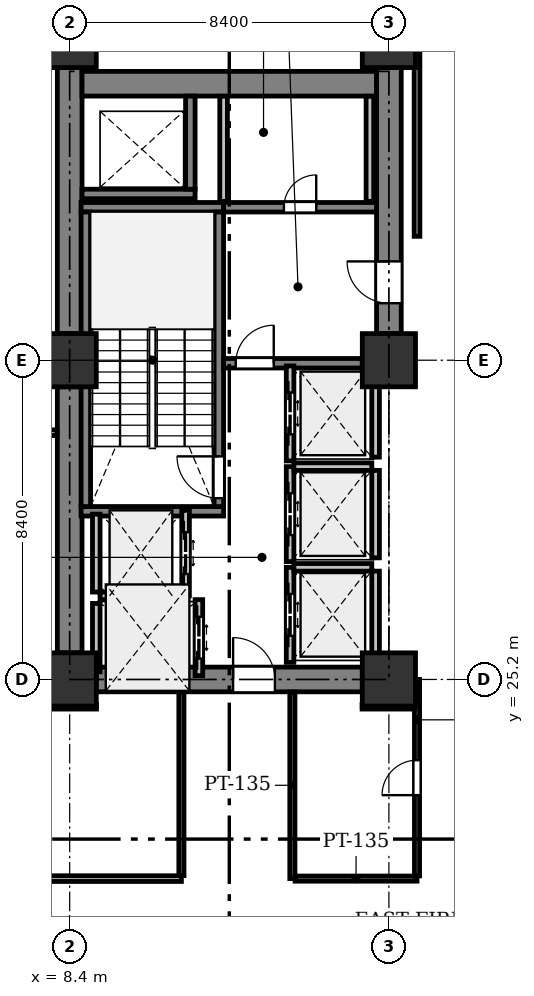
"""IFC4 building model, lengths in metres.
Left out: names, types, materials, properties, quantities, classifications, styles, units other than length and angle.
Written with IfcOpenShell. Run it as: python <this file> out.ifc"""

import sys

from ifc_helpers import new_model, si_unit, direction, frame, frame_2d, origin, origin_2d, place, context, subcontext, project, spatial, rectangle, extrude, element, fill, save


model = new_model("IFC4")
c1 = context("Model", 3, precision=1e-05, world=origin(), true_north=direction((0.0, 1.0)))
c2 = subcontext(c1, "Body", "Model", "MODEL_VIEW")
j1 = project(units=[si_unit("LENGTHUNIT", "METRE"), si_unit("PLANEANGLEUNIT", "RADIAN")], contexts=[c1])
p1 = place(None, origin())
s1 = spatial("IfcSite", under=j1, at=p1, CompositionType="ELEMENT")
p2 = place(p1, origin())
s2 = spatial("IfcBuilding", under=s1, at=p2, CompositionType="ELEMENT")
p3 = place(p2, frame((0.0, 0.0, 24.8)))
s3 = spatial("IfcBuildingStorey", under=s2, at=p3, CompositionType="ELEMENT", Elevation=24.8)
for number, where, z_axis, x_axis in (
    (1, (8.4, 25.2, 0.0), (0.0, 0.0, 1.0), (1.0, 0.0, 0.0)),
    (2, (8.4, 33.6, 0.0), (0.0, 0.0, 1.0), (1.0, 0.0, 0.0)),
    (3, (8.4, 42.0, 0.0), (0.0, 0.0, 1.0), (1.0, 0.0, 0.0)),
    (4, (16.8, 25.2, 0.0), (0.0, 0.0, 1.0), (1.0, 0.0, 0.0)),
    (5, (16.8, 33.6, 0.0), (0.0, 0.0, 1.0), (1.0, 0.0, 0.0)),
    (6, (16.8, 42.0, 0.0), (0.0, 0.0, 1.0), (1.0, 0.0, 0.0)),
):
    element("IfcColumn", number, at=place(p3, frame(where, z_axis=z_axis, x_axis=x_axis)), inside=s3, PredefinedType="COLUMN", context=c2, shape_type="SweptSolid", body=[
        extrude(rectangle(XDim=1.4, YDim=1.4, at=origin_2d()), origin(), (0.0, 0.0, 1.0), 4.2),
    ])
for number, where, z_axis, x_axis in (
    (7, (8.4, 25.9, 0.0), (0.0, 0.0, 1.0), (0.0, 1.0, 0.0)),
    (8, (8.4, 34.3, 0.0), (0.0, 0.0, 1.0), (0.0, 1.0, 0.0)),
):
    element("IfcWall", number, at=place(p3, frame(where, z_axis=z_axis, x_axis=x_axis)), inside=s3, PredefinedType="SHEAR", context=c2, shape_type="SweptSolid", body=[
        extrude(rectangle(XDim=7.0, YDim=0.65, at=frame_2d((3.5, 0.0))), origin(), (0.0, 0.0, 1.0), 3.925),
    ])
p4 = place(p3, frame((8.725, 40.875, 0.0), z_axis=(0.0, 0.0, 1.0), x_axis=(1.0, 0.0, 0.0)))
e9 = element("IfcWall", 9, at=p4, inside=s3, PredefinedType="SHEAR", context=c2, shape_type="SweptSolid", body=[
    extrude(rectangle(XDim=7.75, YDim=0.65, at=frame_2d((3.875, 0.0))), origin(), (0.0, 0.0, 1.0), 3.925),
])
p5 = place(p3, frame((16.8, 34.3, 0.0), z_axis=(0.0, 0.0, 1.0), x_axis=(0.0, 1.0, 0.0)))
e10 = element("IfcWall", 10, at=p5, inside=s3, PredefinedType="SHEAR", context=c2, shape_type="SweptSolid", body=[
    extrude(rectangle(XDim=7.0, YDim=0.65, at=frame_2d((3.5, 0.0))), origin(), (0.0, 0.0, 1.0), 3.925),
])
p6 = place(p5, frame((0.8, 0.0, 0.0)))
e11 = element("IfcOpeningElement", 11, at=p6, cuts=e10, PredefinedType="OPENING", context=c2, shape_type="SweptSolid", body=[
    extrude(rectangle(XDim=1.1, YDim=2.15, at=frame_2d((0.55, 1.075))), frame((0.0, 0.335, 0.0), z_axis=(0.0, -1.0, 0.0), x_axis=(1.0, 0.0, 0.0)), (0.0, 0.0, 1.0), 0.67),
])
p7 = place(p3, frame((9.1, 25.2, 0.0), z_axis=(0.0, 0.0, 1.0), x_axis=(1.0, 0.0, 0.0)))
e12 = element("IfcWall", 12, at=p7, inside=s3, PredefinedType="SHEAR", context=c2, shape_type="SweptSolid", body=[
    extrude(rectangle(XDim=7.0, YDim=0.65, at=frame_2d((3.5, 0.0))), origin(), (0.0, 0.0, 1.0), 3.925),
])
p8 = place(p7, frame((3.6, 0.0, 0.0)))
e13 = element("IfcOpeningElement", 13, at=p8, cuts=e12, PredefinedType="OPENING", context=c2, shape_type="SweptSolid", body=[
    extrude(rectangle(XDim=1.1, YDim=2.15, at=frame_2d((0.55, 1.075))), frame((0.0, 0.335, 0.0), z_axis=(0.0, -1.0, 0.0), x_axis=(1.0, 0.0, 0.0)), (0.0, 0.0, 1.0), 0.67),
])
for number, where, z_axis, x_axis in (
    (14, (12.45, 29.625, 0.0), (0.0, 0.0, 1.0), (-1.0, 0.0, 0.0)),
    (15, (12.45, 37.625, 0.0), (0.0, 0.0, 1.0), (-1.0, 0.0, 0.0)),
):
    element("IfcWall", number, at=place(p3, frame(where, z_axis=z_axis, x_axis=x_axis)), inside=s3, PredefinedType="SHEAR", context=c2, shape_type="SweptSolid", body=[
        extrude(rectangle(XDim=3.75, YDim=0.25, at=frame_2d((1.875, 0.0))), origin(), (0.0, 0.0, 1.0), 3.925),
    ])
p9 = place(p3, frame((12.325, 29.75, 0.0), z_axis=(0.0, 0.0, 1.0), x_axis=(0.0, 1.0, 0.0)))
e16 = element("IfcWall", 16, at=p9, inside=s3, PredefinedType="SHEAR", context=c2, shape_type="SweptSolid", body=[
    extrude(rectangle(XDim=7.75, YDim=0.25, at=frame_2d((3.875, 0.0))), origin(), (0.0, 0.0, 1.0), 3.925),
])
p10 = place(p9, frame((0.22, 0.0, 0.0)))
e17 = element("IfcOpeningElement", 17, at=p10, cuts=e16, PredefinedType="OPENING", context=c2, shape_type="SweptSolid", body=[
    extrude(rectangle(XDim=1.1, YDim=2.15, at=frame_2d((0.55, 1.075))), frame((0.0, 0.135, 0.0), z_axis=(0.0, -1.0, 0.0), x_axis=(1.0, 0.0, 0.0)), (0.0, 0.0, 1.0), 0.27),
])
p11 = place(p3, frame((8.825, 29.75, 0.0), z_axis=(0.0, 0.0, 1.0), x_axis=(0.0, 1.0, 0.0)))
e18 = element("IfcWall", 18, at=p11, inside=s3, PredefinedType="SHEAR", context=c2, shape_type="SweptSolid", body=[
    extrude(rectangle(XDim=7.75, YDim=0.25, at=frame_2d((3.875, 0.0))), origin(), (0.0, 0.0, 1.0), 3.925),
])
p12 = place(p3, frame((8.725, 37.975, 0.0), z_axis=(0.0, 0.0, 1.0), x_axis=(1.0, 0.0, 0.0)))
e19 = element("IfcWall", 19, at=p12, inside=s3, PredefinedType="SHEAR", context=c2, shape_type="SweptSolid", body=[
    extrude(rectangle(XDim=2.975, YDim=0.25, at=frame_2d((1.487, 0.0))), origin(), (0.0, 0.0, 1.0), 3.925),
])
p13 = place(p3, frame((11.575, 38.1, 0.0), z_axis=(0.0, 0.0, 1.0), x_axis=(0.0, 1.0, 0.0)))
e20 = element("IfcWall", 20, at=p13, inside=s3, PredefinedType="SHEAR", context=c2, shape_type="SweptSolid", body=[
    extrude(rectangle(XDim=2.45, YDim=0.25, at=frame_2d((1.225, 0.0))), origin(), (0.0, 0.0, 1.0), 3.925),
])
p14 = place(p3, frame((12.45, 33.52, 0.0), z_axis=(0.0, 0.0, 1.0), x_axis=(1.0, 0.0, 0.0)))
e21 = element("IfcWall", 21, at=p14, inside=s3, PredefinedType="SHEAR", context=c2, shape_type="SweptSolid", body=[
    extrude(rectangle(XDim=3.65, YDim=0.25, at=frame_2d((1.825, 0.0))), origin(), (0.0, 0.0, 1.0), 3.925),
])
p15 = place(p14, frame((0.32, 0.0, 0.0)))
e22 = element("IfcOpeningElement", 22, at=p15, cuts=e21, PredefinedType="OPENING", context=c2, shape_type="SweptSolid", body=[
    extrude(rectangle(XDim=1.0, YDim=2.15, at=frame_2d((0.5, 1.075))), frame((0.0, 0.135, 0.0), z_axis=(0.0, -1.0, 0.0), x_axis=(1.0, 0.0, 0.0)), (0.0, 0.0, 1.0), 0.27),
])
p16 = place(p3, frame((12.45, 37.625, 0.0), z_axis=(0.0, 0.0, 1.0), x_axis=(1.0, 0.0, 0.0)))
e23 = element("IfcWall", 23, at=p16, inside=s3, PredefinedType="SHEAR", context=c2, shape_type="SweptSolid", body=[
    extrude(rectangle(XDim=4.025, YDim=0.25, at=frame_2d((2.013, 0.0))), origin(), (0.0, 0.0, 1.0), 3.925),
])
p17 = place(p16, frame((1.587, 0.0, 0.0)))
e24 = element("IfcOpeningElement", 24, at=p17, cuts=e23, PredefinedType="OPENING", context=c2, shape_type="SweptSolid", body=[
    extrude(rectangle(XDim=0.85, YDim=2.15, at=frame_2d((0.425, 1.075))), frame((0.0, 0.135, 0.0), z_axis=(0.0, -1.0, 0.0), x_axis=(1.0, 0.0, 0.0)), (0.0, 0.0, 1.0), 0.27),
])
p18 = place(p3, frame((11.45, 27.4, 0.0), z_axis=(0.0, 0.0, 1.0), x_axis=(0.0, 1.0, 0.0)))
e25 = element("IfcWall", 25, at=p18, inside=s3, PredefinedType="PARTITIONING", context=c2, shape_type="SweptSolid", body=[
    extrude(rectangle(XDim=2.25, YDim=0.2, at=frame_2d((1.125, 0.0))), origin(), (0.0, 0.0, 1.0), 3.925),
])
p19 = place(p18, frame((0.575, 0.0, 0.0)))
e26 = element("IfcOpeningElement", 26, at=p19, cuts=e25, PredefinedType="OPENING", context=c2, shape_type="SweptSolid", body=[
    extrude(rectangle(XDim=1.1, YDim=2.2, at=frame_2d((0.55, 1.1))), frame((0.0, 0.11, 0.0), z_axis=(0.0, -1.0, 0.0), x_axis=(1.0, 0.0, 0.0)), (0.0, 0.0, 1.0), 0.22),
])
p20 = place(p3, frame((9.1, 27.5, 0.0), z_axis=(0.0, 0.0, 1.0), x_axis=(0.0, 1.0, 0.0)))
e27 = element("IfcWall", 27, at=p20, inside=s3, PredefinedType="PARTITIONING", context=c2, shape_type="SweptSolid", body=[
    extrude(rectangle(XDim=2.05, YDim=0.2, at=frame_2d((1.025, 0.0))), origin(), (0.0, 0.0, 1.0), 3.925),
])
p21 = place(p3, frame((9.2, 27.4, 0.0), z_axis=(0.0, 0.0, 1.0), x_axis=(1.0, 0.0, 0.0)))
e28 = element("IfcWall", 28, at=p21, inside=s3, PredefinedType="PARTITIONING", context=c2, shape_type="SweptSolid", body=[
    extrude(rectangle(XDim=2.15, YDim=0.2, at=frame_2d((1.075, 0.0))), origin(), (0.0, 0.0, 1.0), 3.925),
])
p22 = place(p3, frame((11.8, 25.3, 0.0), z_axis=(0.0, 0.0, 1.0), x_axis=(0.0, 1.0, 0.0)))
e29 = element("IfcWall", 29, at=p22, inside=s3, PredefinedType="PARTITIONING", context=c2, shape_type="SweptSolid", body=[
    extrude(rectangle(XDim=2.0, YDim=0.2, at=frame_2d((1.0, 0.0))), origin(), (0.0, 0.0, 1.0), 3.925),
])
p23 = place(p22, frame((0.45, 0.0, 0.0)))
e30 = element("IfcOpeningElement", 30, at=p23, cuts=e29, PredefinedType="OPENING", context=c2, shape_type="SweptSolid", body=[
    extrude(rectangle(XDim=1.1, YDim=2.2, at=frame_2d((0.55, 1.1))), frame((0.0, 0.11, 0.0), z_axis=(0.0, -1.0, 0.0), x_axis=(1.0, 0.0, 0.0)), (0.0, 0.0, 1.0), 0.22),
])
p24 = place(p3, frame((9.1, 25.4, 0.0), z_axis=(0.0, 0.0, 1.0), x_axis=(0.0, 1.0, 0.0)))
e31 = element("IfcWall", 31, at=p24, inside=s3, PredefinedType="PARTITIONING", context=c2, shape_type="SweptSolid", body=[
    extrude(rectangle(XDim=1.8, YDim=0.2, at=frame_2d((0.9, 0.0))), origin(), (0.0, 0.0, 1.0), 3.925),
])
p25 = place(p3, frame((14.2, 25.65, 0.0), z_axis=(0.0, 0.0, 1.0), x_axis=(0.0, 1.0, 0.0)))
e32 = element("IfcWall", 32, at=p25, inside=s3, PredefinedType="PARTITIONING", context=c2, shape_type="SweptSolid", body=[
    extrude(rectangle(XDim=2.5, YDim=0.2, at=frame_2d((1.25, 0.0))), origin(), (0.0, 0.0, 1.0), 3.925),
])
p26 = place(p25, frame((0.7, 0.0, 0.0)))
e33 = element("IfcOpeningElement", 33, at=p26, cuts=e32, PredefinedType="OPENING", context=c2, shape_type="SweptSolid", body=[
    extrude(rectangle(XDim=1.1, YDim=2.2, at=frame_2d((0.55, 1.1))), frame((0.0, 0.11, 0.0), z_axis=(0.0, -1.0, 0.0), x_axis=(1.0, 0.0, 0.0)), (0.0, 0.0, 1.0), 0.22),
])
p27 = place(p3, frame((16.45, 25.75, 0.0), z_axis=(0.0, 0.0, 1.0), x_axis=(0.0, 1.0, 0.0)))
e34 = element("IfcWall", 34, at=p27, inside=s3, PredefinedType="PARTITIONING", context=c2, shape_type="SweptSolid", body=[
    extrude(rectangle(XDim=2.3, YDim=0.2, at=frame_2d((1.15, 0.0))), origin(), (0.0, 0.0, 1.0), 3.925),
])
p28 = place(p3, frame((14.3, 28.15, 0.0), z_axis=(0.0, 0.0, 1.0), x_axis=(1.0, 0.0, 0.0)))
e35 = element("IfcWall", 35, at=p28, inside=s3, PredefinedType="PARTITIONING", context=c2, shape_type="SweptSolid", body=[
    extrude(rectangle(XDim=2.05, YDim=0.2, at=frame_2d((1.025, 0.0))), origin(), (0.0, 0.0, 1.0), 3.925),
])
p29 = place(p3, frame((14.2, 28.3, 0.0), z_axis=(0.0, 0.0, 1.0), x_axis=(0.0, 1.0, 0.0)))
e36 = element("IfcWall", 36, at=p29, inside=s3, PredefinedType="PARTITIONING", context=c2, shape_type="SweptSolid", body=[
    extrude(rectangle(XDim=2.5, YDim=0.2, at=frame_2d((1.25, 0.0))), origin(), (0.0, 0.0, 1.0), 3.925),
])
p30 = place(p29, frame((0.7, 0.0, 0.0)))
e37 = element("IfcOpeningElement", 37, at=p30, cuts=e36, PredefinedType="OPENING", context=c2, shape_type="SweptSolid", body=[
    extrude(rectangle(XDim=1.1, YDim=2.2, at=frame_2d((0.55, 1.1))), frame((0.0, 0.11, 0.0), z_axis=(0.0, -1.0, 0.0), x_axis=(1.0, 0.0, 0.0)), (0.0, 0.0, 1.0), 0.22),
])
p31 = place(p3, frame((16.45, 28.4, 0.0), z_axis=(0.0, 0.0, 1.0), x_axis=(0.0, 1.0, 0.0)))
e38 = element("IfcWall", 38, at=p31, inside=s3, PredefinedType="PARTITIONING", context=c2, shape_type="SweptSolid", body=[
    extrude(rectangle(XDim=2.3, YDim=0.2, at=frame_2d((1.15, 0.0))), origin(), (0.0, 0.0, 1.0), 3.925),
])
p32 = place(p3, frame((14.3, 30.8, 0.0), z_axis=(0.0, 0.0, 1.0), x_axis=(1.0, 0.0, 0.0)))
e39 = element("IfcWall", 39, at=p32, inside=s3, PredefinedType="PARTITIONING", context=c2, shape_type="SweptSolid", body=[
    extrude(rectangle(XDim=2.05, YDim=0.2, at=frame_2d((1.025, 0.0))), origin(), (0.0, 0.0, 1.0), 3.925),
])
p33 = place(p3, frame((14.2, 30.95, 0.0), z_axis=(0.0, 0.0, 1.0), x_axis=(0.0, 1.0, 0.0)))
e40 = element("IfcWall", 40, at=p33, inside=s3, PredefinedType="PARTITIONING", context=c2, shape_type="SweptSolid", body=[
    extrude(rectangle(XDim=2.5, YDim=0.2, at=frame_2d((1.25, 0.0))), origin(), (0.0, 0.0, 1.0), 3.925),
])
p34 = place(p33, frame((0.7, 0.0, 0.0)))
e41 = element("IfcOpeningElement", 41, at=p34, cuts=e40, PredefinedType="OPENING", context=c2, shape_type="SweptSolid", body=[
    extrude(rectangle(XDim=1.1, YDim=2.2, at=frame_2d((0.55, 1.1))), frame((0.0, 0.11, 0.0), z_axis=(0.0, -1.0, 0.0), x_axis=(1.0, 0.0, 0.0)), (0.0, 0.0, 1.0), 0.22),
])
p35 = place(p3, frame((16.45, 31.05, 0.0), z_axis=(0.0, 0.0, 1.0), x_axis=(0.0, 1.0, 0.0)))
e42 = element("IfcWall", 42, at=p35, inside=s3, PredefinedType="PARTITIONING", context=c2, shape_type="SweptSolid", body=[
    extrude(rectangle(XDim=2.3, YDim=0.2, at=frame_2d((1.15, 0.0))), origin(), (0.0, 0.0, 1.0), 3.925),
])
for number, where, z_axis, x_axis in (
    (43, (16.3, 37.78, 0.0), (0.0, 0.0, 1.0), (0.0, 1.0, 0.0)),
    (44, (12.45, 40.546, 0.0), (0.0, 0.0, 1.0), (0.0, -1.0, 0.0)),
):
    element("IfcWall", number, at=place(p3, frame(where, z_axis=z_axis, x_axis=x_axis)), inside=s3, PredefinedType="PARTITIONING", context=c2, shape_type="SweptSolid", body=[
        extrude(rectangle(XDim=2.766, YDim=0.2, at=frame_2d((1.383, 0.0))), origin(), (0.0, 0.0, 1.0), 2.825),
    ])
p36 = place(p3, frame((14.26, 24.871, 0.0), z_axis=(0.0, 0.0, 1.0), x_axis=(0.0, -1.0, 0.0)))
e45 = element("IfcWall", 45, at=p36, inside=s3, PredefinedType="PARTITIONING", context=c2, shape_type="SweptSolid", body=[
    extrude(rectangle(XDim=4.911, YDim=0.135, at=frame_2d((2.456, 0.0))), origin(), (0.0, 0.0, 1.0), 3.925),
])
p37 = place(p3, frame((14.332, 19.96, 0.0), z_axis=(0.0, 0.0, 1.0), x_axis=(1.0, 0.0, 0.0)))
e46 = element("IfcWall", 46, at=p37, inside=s3, PredefinedType="PARTITIONING", context=c2, shape_type="SweptSolid", body=[
    extrude(rectangle(XDim=3.208, YDim=0.135, at=frame_2d((1.604, 0.0))), origin(), (0.0, 0.0, 1.0), 3.323),
])
p38 = place(p3, frame((17.54, 20.031, 0.0), z_axis=(0.0, 0.0, 1.0), x_axis=(0.0, 1.0, 0.0)))
e47 = element("IfcWall", 47, at=p38, inside=s3, PredefinedType="PARTITIONING", context=c2, shape_type="SweptSolid", body=[
    extrude(rectangle(XDim=5.168, YDim=0.135, at=frame_2d((2.584, 0.0))), origin(), (0.0, 0.0, 1.0), 3.313),
])
p39 = place(p38, frame((2.124, 0.0, 0.0)))
e48 = element("IfcOpeningElement", 48, at=p39, cuts=e47, PredefinedType="OPENING", context=c2, shape_type="SweptSolid", body=[
    extrude(rectangle(XDim=0.92, YDim=2.1, at=frame_2d((0.46, 1.05))), frame((0.0, 0.077, 0.0), z_axis=(0.0, -1.0, 0.0), x_axis=(1.0, 0.0, 0.0)), (0.0, 0.0, 1.0), 0.155),
])
p40 = place(p3, frame((17.469, 24.48, 0.0), z_axis=(0.0, 0.0, 1.0), x_axis=(-0.99999993688, 0.000355302873, 0.0)))
e49 = element("IfcWall", 49, at=p40, inside=s3, PredefinedType="PARTITIONING", context=c2, shape_type="SweptSolid", body=[
    extrude(rectangle(XDim=1.374, YDim=0.12, at=frame_2d((0.687, 0.0))), origin(), (0.0, 0.0, 1.0), 3.323),
])
p41 = place(p3, frame((0.169, 31.693, 0.0), z_axis=(0.0, 0.0, 1.0), x_axis=(1.0, 0.0, 0.0)))
e50 = element("IfcWall", 50, at=p41, inside=s3, PredefinedType="PARTITIONING", context=c2, shape_type="SweptSolid", body=[
    extrude(rectangle(XDim=7.902, YDim=0.15, at=frame_2d((3.951, 0.0))), origin(), (0.0, 0.0, 1.0), 3.566),
])
p42 = place(p3, frame((17.54, 36.86, 0.0), z_axis=(0.0, 0.0, 1.0), x_axis=(0.0, 1.0, 0.0)))
e51 = element("IfcWall", 51, at=p42, inside=s3, PredefinedType="PARTITIONING", context=c2, shape_type="SweptSolid", body=[
    extrude(rectangle(XDim=8.34, YDim=0.15, at=frame_2d((4.17, 0.0))), origin(), (0.0, 0.0, 1.0), 3.313),
])
p43 = place(p3, frame((9.106, 24.481, 0.0), z_axis=(0.0, 0.0, 1.0), x_axis=(-0.999999758706, -0.000694685487, 0.0)))
e52 = element("IfcWall", 52, at=p43, inside=s3, PredefinedType="PARTITIONING", context=c2, shape_type="SweptSolid", body=[
    extrude(rectangle(XDim=1.406, YDim=0.12, at=frame_2d((0.703, 0.0))), origin(), (0.0, 0.0, 1.0), 3.323),
])
p44 = place(p3, frame((5.4, 19.96, 0.0), z_axis=(0.0, 0.0, 1.0), x_axis=(1.0, 0.0, 0.0)))
e53 = element("IfcWall", 53, at=p44, inside=s3, PredefinedType="PARTITIONING", context=c2, shape_type="SweptSolid", body=[
    extrude(rectangle(XDim=5.94, YDim=0.15, at=frame_2d((2.97, 0.0))), origin(), (0.0, 0.0, 1.0), 3.323),
])
p45 = place(p3, frame((11.34, 20.039, 0.0), z_axis=(0.0, 0.0, 1.0), x_axis=(0.0, 1.0, 0.0)))
e54 = element("IfcWall", 54, at=p45, inside=s3, PredefinedType="PARTITIONING", context=c2, shape_type="SweptSolid", body=[
    extrude(rectangle(XDim=4.832, YDim=0.135, at=frame_2d((2.416, 0.0))), origin(), (0.0, 0.0, 1.0), 3.925),
])
p46 = place(p6, origin())
e55 = element("IfcDoor", 55, at=p46, inside=s3, OperationType="SINGLE_SWING_RIGHT", PredefinedType="DOOR", context=c2, shape_type="SweptSolid", body=[
    extrude(rectangle(XDim=1.1, YDim=2.15, at=frame_2d((0.55, 1.075))), frame((0.0, 0.025, 0.0), z_axis=(0.0, -1.0, 0.0), x_axis=(1.0, 0.0, 0.0)), (0.0, 0.0, 1.0), 0.05),
])
fill(e11, e55)
p47 = place(p8, origin())
e56 = element("IfcDoor", 56, at=p47, inside=s3, OperationType="SINGLE_SWING_LEFT", PredefinedType="DOOR", context=c2, shape_type="SweptSolid", body=[
    extrude(rectangle(XDim=1.1, YDim=2.15, at=frame_2d((0.55, 1.075))), frame((0.0, 0.025, 0.0), z_axis=(0.0, -1.0, 0.0), x_axis=(1.0, 0.0, 0.0)), (0.0, 0.0, 1.0), 0.05),
])
fill(e13, e56)
p48 = place(p10, origin())
e57 = element("IfcDoor", 57, at=p48, inside=s3, OperationType="SINGLE_SWING_RIGHT", PredefinedType="DOOR", context=c2, shape_type="SweptSolid", body=[
    extrude(rectangle(XDim=1.1, YDim=2.15, at=frame_2d((0.55, 1.075))), frame((0.0, 0.025, 0.0), z_axis=(0.0, -1.0, 0.0), x_axis=(1.0, 0.0, 0.0)), (0.0, 0.0, 1.0), 0.05),
])
fill(e17, e57)
p49 = place(p15, origin())
e58 = element("IfcDoor", 58, at=p49, inside=s3, OperationType="SINGLE_SWING_RIGHT", PredefinedType="DOOR", context=c2, shape_type="SweptSolid", body=[
    extrude(rectangle(XDim=1.0, YDim=2.15, at=frame_2d((0.5, 1.075))), frame((0.0, 0.025, 0.0), z_axis=(0.0, -1.0, 0.0), x_axis=(1.0, 0.0, 0.0)), (0.0, 0.0, 1.0), 0.05),
])
fill(e22, e58)
p50 = place(p19, origin())
e59 = element("IfcDoor", 59, at=p50, inside=s3, OperationType="DOUBLE_DOOR_SLIDING", PredefinedType="DOOR", context=c2, shape_type="SweptSolid", body=[
    extrude(rectangle(XDim=1.1, YDim=2.2, at=frame_2d((0.55, 1.1))), frame((0.0, 0.025, 0.0), z_axis=(0.0, -1.0, 0.0), x_axis=(1.0, 0.0, 0.0)), (0.0, 0.0, 1.0), 0.05),
])
fill(e26, e59)
p51 = place(p23, origin())
e60 = element("IfcDoor", 60, at=p51, inside=s3, OperationType="DOUBLE_DOOR_SLIDING", PredefinedType="DOOR", context=c2, shape_type="SweptSolid", body=[
    extrude(rectangle(XDim=1.1, YDim=2.2, at=frame_2d((0.55, 1.1))), frame((0.0, 0.025, 0.0), z_axis=(0.0, -1.0, 0.0), x_axis=(1.0, 0.0, 0.0)), (0.0, 0.0, 1.0), 0.05),
])
fill(e30, e60)
p52 = place(p26, origin())
e61 = element("IfcDoor", 61, at=p52, inside=s3, OperationType="DOUBLE_DOOR_SLIDING", PredefinedType="DOOR", context=c2, shape_type="SweptSolid", body=[
    extrude(rectangle(XDim=1.1, YDim=2.2, at=frame_2d((0.55, 1.1))), frame((0.0, 0.025, 0.0), z_axis=(0.0, -1.0, 0.0), x_axis=(1.0, 0.0, 0.0)), (0.0, 0.0, 1.0), 0.05),
])
fill(e33, e61)
p53 = place(p30, origin())
e62 = element("IfcDoor", 62, at=p53, inside=s3, OperationType="DOUBLE_DOOR_SLIDING", PredefinedType="DOOR", context=c2, shape_type="SweptSolid", body=[
    extrude(rectangle(XDim=1.1, YDim=2.2, at=frame_2d((0.55, 1.1))), frame((0.0, 0.025, 0.0), z_axis=(0.0, -1.0, 0.0), x_axis=(1.0, 0.0, 0.0)), (0.0, 0.0, 1.0), 0.05),
])
fill(e37, e62)
p54 = place(p34, origin())
e63 = element("IfcDoor", 63, at=p54, inside=s3, OperationType="DOUBLE_DOOR_SLIDING", PredefinedType="DOOR", context=c2, shape_type="SweptSolid", body=[
    extrude(rectangle(XDim=1.1, YDim=2.2, at=frame_2d((0.55, 1.1))), frame((0.0, 0.025, 0.0), z_axis=(0.0, -1.0, 0.0), x_axis=(1.0, 0.0, 0.0)), (0.0, 0.0, 1.0), 0.05),
])
fill(e41, e63)
p55 = place(p17, origin())
e64 = element("IfcDoor", 64, at=p55, inside=s3, OperationType="SINGLE_SWING_RIGHT", PredefinedType="DOOR", context=c2, shape_type="SweptSolid", body=[
    extrude(rectangle(XDim=0.85, YDim=2.15, at=frame_2d((0.425, 1.075))), frame((0.0, 0.025, 0.0), z_axis=(0.0, -1.0, 0.0), x_axis=(1.0, 0.0, 0.0)), (0.0, 0.0, 1.0), 0.05),
])
fill(e24, e64)
p56 = place(p39, origin())
e65 = element("IfcDoor", 65, at=p56, inside=s3, OperationType="SINGLE_SWING_LEFT", PredefinedType="DOOR", context=c2, shape_type="SweptSolid", body=[
    extrude(rectangle(XDim=0.92, YDim=2.1, at=frame_2d((0.46, 1.05))), frame((0.0, 0.025, 0.0), z_axis=(0.0, -1.0, 0.0), x_axis=(1.0, 0.0, 0.0)), (0.0, 0.0, 1.0), 0.05),
])
fill(e48, e65)
save(model, sys.argv[1])
